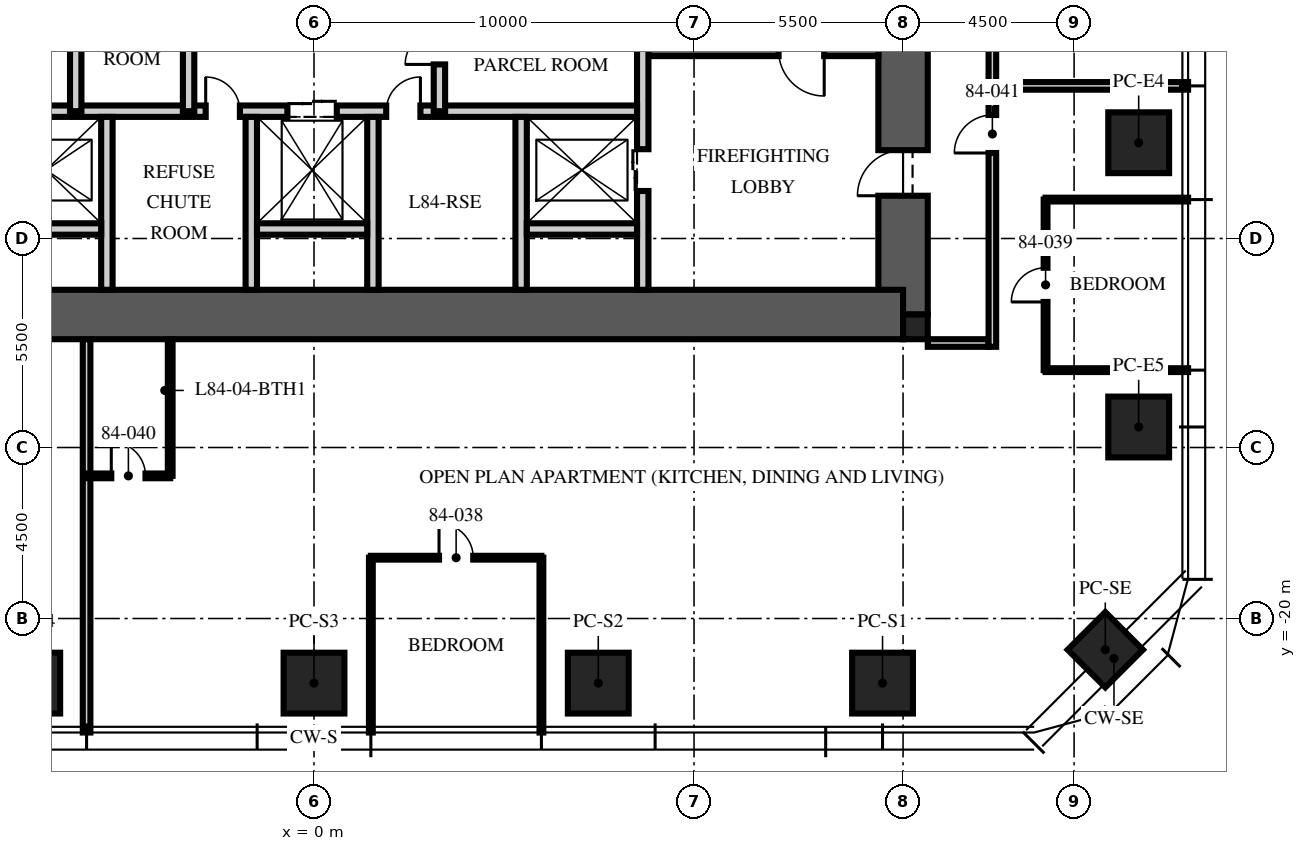
"""IFC4 building model, lengths in metres.
Left out: names, types, materials, properties, quantities, classifications, styles, units other than length and angle.
Written with IfcOpenShell. Run it as: python <this file> out.ifc"""

import sys

from ifc_helpers import new_model, si_unit, direction, frame, frame_2d, origin, origin_2d, place, context, subcontext, project, spatial, rectangle, extrude, element, fill, save


model = new_model("IFC4")
c1 = context("Model", 3, precision=1e-05, world=origin(), true_north=direction((0.0, 1.0)))
c2 = subcontext(c1, "Body", "Model", "MODEL_VIEW")
j1 = project(units=[si_unit("LENGTHUNIT", "METRE"), si_unit("PLANEANGLEUNIT", "RADIAN")], contexts=[c1])
p1 = place(None, origin())
s1 = spatial("IfcSite", under=j1, at=p1, CompositionType="ELEMENT")
p2 = place(p1, origin())
s2 = spatial("IfcBuilding", under=s1, at=p2, CompositionType="ELEMENT")
p3 = place(p2, frame((0.0, 0.0, 334.5)))
s3 = spatial("IfcBuildingStorey", under=s2, at=p3, CompositionType="ELEMENT", Elevation=334.5)
p4 = place(p3, frame((15.5, -12.0, -0.25), z_axis=(0.0, 0.0, 1.0), x_axis=(0.0, 1.0, 0.0)))
e1 = element("IfcWall", 1, at=p4, inside=s3, PredefinedType="SHEAR", context=c2, shape_type="SweptSolid", body=[
    extrude(rectangle(XDim=24.0, YDim=1.3, at=frame_2d((12.0, 0.0))), origin(), (0.0, 0.0, 1.0), 3.75),
])
p5 = place(p4, frame((3.125, 0.0, 0.25)))
e2 = element("IfcOpeningElement", 2, at=p5, cuts=e1, PredefinedType="OPENING", context=c2, shape_type="SweptSolid", body=[
    extrude(rectangle(XDim=1.2, YDim=2.1, at=frame_2d((0.6, 1.05))), frame((0.0, 0.66, 0.0), z_axis=(0.0, -1.0, 0.0), x_axis=(1.0, 0.0, 0.0)), (0.0, 0.0, 1.0), 1.32),
])
p6 = place(p4, frame((19.375, 0.0, 0.25)))
e3 = element("IfcOpeningElement", 3, at=p6, cuts=e1, PredefinedType="OPENING", context=c2, shape_type="SweptSolid", body=[
    extrude(rectangle(XDim=1.8, YDim=2.1, at=frame_2d((0.9, 1.05))), frame((0.0, 0.66, 0.0), z_axis=(0.0, -1.0, 0.0), x_axis=(1.0, 0.0, 0.0)), (0.0, 0.0, 1.0), 1.32),
])
p7 = place(p3, frame((-15.5, -12.0, -0.25), z_axis=(0.0, 0.0, 1.0), x_axis=(1.0, 0.0, 0.0)))
e4 = element("IfcWall", 4, at=p7, inside=s3, PredefinedType="SHEAR", context=c2, shape_type="SweptSolid", body=[
    extrude(rectangle(XDim=31.0, YDim=1.3, at=frame_2d((15.5, 0.0))), origin(), (0.0, 0.0, 1.0), 3.75),
])
p8 = place(p3, frame((15.825, -12.325, -0.25), z_axis=(0.0, 0.0, 1.0), x_axis=(1.0, 0.0, 0.0)))
e5 = element("IfcColumn", 5, at=p8, inside=s3, PredefinedType="COLUMN", context=c2, shape_type="SweptSolid", body=[
    extrude(rectangle(XDim=0.65, YDim=0.65, at=origin_2d()), origin(), (0.0, 0.0, 1.0), 3.75),
])
for number, where, z_axis, x_axis in (
    (6, (21.7, -7.48, 0.0), (0.0, 0.0, 1.0), (0.0, 1.0, 0.0)),
    (7, (21.7, -14.96, 0.0), (0.0, 0.0, 1.0), (0.0, 1.0, 0.0)),
    (8, (14.96, -21.7, 0.0), (0.0, 0.0, 1.0), (1.0, 0.0, 0.0)),
    (9, (7.48, -21.7, 0.0), (0.0, 0.0, 1.0), (1.0, 0.0, 0.0)),
    (10, (0.0, -21.7, 0.0), (0.0, 0.0, 1.0), (1.0, 0.0, 0.0)),
    (11, (-7.48, -21.7, 0.0), (0.0, 0.0, 1.0), (1.0, 0.0, 0.0)),
):
    element("IfcColumn", number, at=place(p3, frame(where, z_axis=z_axis, x_axis=x_axis)), inside=s3, PredefinedType="COLUMN", context=c2, shape_type="SweptSolid", body=[
        extrude(rectangle(XDim=1.6, YDim=1.6, at=origin_2d()), origin(), (0.0, 0.0, 1.0), 3.75),
    ])
p9 = place(p3, frame((20.821, -20.821, 0.0), z_axis=(0.0, 0.0, 1.0), x_axis=(0.707106781187, 0.707106781187, 0.0)))
e12 = element("IfcColumn", 12, at=p9, inside=s3, PredefinedType="COLUMN", context=c2, shape_type="SweptSolid", body=[
    extrude(rectangle(XDim=1.4, YDim=1.4, at=origin_2d()), origin(), (0.0, 0.0, 1.0), 3.75),
])
p10 = place(p3, frame((14.85, -5.05, 0.0), z_axis=(0.0, 0.0, 1.0), x_axis=(-1.0, 0.0, 0.0)))
e13 = element("IfcWall", 13, at=p10, inside=s3, PredefinedType="SOLIDWALL", context=c2, shape_type="SweptSolid", body=[
    extrude(rectangle(XDim=6.05, YDim=0.3, at=frame_2d((3.025, 0.0))), origin(), (0.0, 0.0, 1.0), 3.5),
])
p11 = place(p10, frame((1.425, 0.0, 0.0)))
e14 = element("IfcOpeningElement", 14, at=p11, cuts=e13, PredefinedType="OPENING", context=c2, shape_type="SweptSolid", body=[
    extrude(rectangle(XDim=1.2, YDim=2.1, at=frame_2d((0.6, 1.05))), frame((0.0, 0.16, 0.0), z_axis=(0.0, -1.0, 0.0), x_axis=(1.0, 0.0, 0.0)), (0.0, 0.0, 1.0), 0.32),
])
p12 = place(p3, frame((8.65, -11.35, 0.0), z_axis=(0.0, 0.0, 1.0), x_axis=(0.0, 1.0, 0.0)))
e15 = element("IfcWall", 15, at=p12, inside=s3, PredefinedType="PARTITIONING", context=c2, shape_type="SweptSolid", body=[
    extrude(rectangle(XDim=6.45, YDim=0.3, at=frame_2d((3.225, 0.0))), origin(), (0.0, 0.0, 1.0), 3.5),
])
p13 = place(p12, frame((2.6, 0.0, 0.0)))
e16 = element("IfcOpeningElement", 16, at=p13, cuts=e15, PredefinedType="OPENING", context=c2, shape_type="SweptSolid", body=[
    extrude(rectangle(XDim=1.1, YDim=2.1, at=frame_2d((0.55, 1.05))), frame((0.0, 0.16, 0.0), z_axis=(0.0, -1.0, 0.0), x_axis=(1.0, 0.0, 0.0)), (0.0, 0.0, 1.0), 0.32),
])
p14 = place(p3, frame((-8.5, -6.65, 0.0), z_axis=(0.0, 0.0, 1.0), x_axis=(1.0, 0.0, 0.0)))
e17 = element("IfcWall", 17, at=p14, inside=s3, PredefinedType="PARTITIONING", context=c2, shape_type="SweptSolid", body=[
    extrude(rectangle(XDim=17.0, YDim=0.3, at=frame_2d((8.5, 0.0))), origin(), (0.0, 0.0, 1.0), 3.5),
])
p15 = place(p14, frame((7.8, 0.0, 0.0)))
e18 = element("IfcOpeningElement", 18, at=p15, cuts=e17, PredefinedType="OPENING", context=c2, shape_type="SweptSolid", body=[
    extrude(rectangle(XDim=1.3, YDim=2.4, at=frame_2d((0.65, 1.2))), frame((0.0, 0.16, 0.0), z_axis=(0.0, -1.0, 0.0), x_axis=(1.0, 0.0, 0.0)), (0.0, 0.0, 1.0), 0.32),
])
p16 = place(p14, frame((5.65, 0.0, 0.0)))
e19 = element("IfcOpeningElement", 19, at=p16, cuts=e17, PredefinedType="OPENING", context=c2, shape_type="SweptSolid", body=[
    extrude(rectangle(XDim=0.9, YDim=2.1, at=frame_2d((0.45, 1.05))), frame((0.0, 0.16, 0.0), z_axis=(0.0, -1.0, 0.0), x_axis=(1.0, 0.0, 0.0)), (0.0, 0.0, 1.0), 0.32),
])
p17 = place(p14, frame((10.4, 0.0, 0.0)))
e20 = element("IfcOpeningElement", 20, at=p17, cuts=e17, PredefinedType="OPENING", context=c2, shape_type="SweptSolid", body=[
    extrude(rectangle(XDim=0.9, YDim=2.1, at=frame_2d((0.45, 1.05))), frame((0.0, 0.16, 0.0), z_axis=(0.0, -1.0, 0.0), x_axis=(1.0, 0.0, 0.0)), (0.0, 0.0, 1.0), 0.32),
])
for number, where, z_axis, x_axis in (
    (21, (-5.45, -11.35, 0.0), (0.0, 0.0, 1.0), (0.0, 1.0, 0.0)),
    (22, (-1.65, -11.35, 0.0), (0.0, 0.0, 1.0), (0.0, 1.0, 0.0)),
    (23, (1.55, -11.35, 0.0), (0.0, 0.0, 1.0), (0.0, 1.0, 0.0)),
    (24, (5.45, -11.35, 0.0), (0.0, 0.0, 1.0), (0.0, 1.0, 0.0)),
):
    element("IfcWall", number, at=place(p3, frame(where, z_axis=z_axis, x_axis=x_axis)), inside=s3, PredefinedType="PARTITIONING", context=c2, shape_type="SweptSolid", body=[
        extrude(rectangle(XDim=4.55, YDim=0.3, at=frame_2d((2.275, 0.0))), origin(), (0.0, 0.0, 1.0), 3.5),
    ])
for number, where, z_axis, x_axis in (
    (25, (-8.5, -9.75, 0.0), (0.0, 0.0, 1.0), (1.0, 0.0, 0.0)),
    (26, (-1.5, -9.75, 0.0), (0.0, 0.0, 1.0), (1.0, 0.0, 0.0)),
    (27, (5.6, -9.75, 0.0), (0.0, 0.0, 1.0), (1.0, 0.0, 0.0)),
):
    element("IfcWall", number, at=place(p3, frame(where, z_axis=z_axis, x_axis=x_axis)), inside=s3, PredefinedType="PARTITIONING", context=c2, shape_type="SweptSolid", body=[
        extrude(rectangle(XDim=2.9, YDim=0.3, at=frame_2d((1.45, 0.0))), origin(), (0.0, 0.0, 1.0), 3.5),
    ])
p18 = place(p3, frame((-3.3, -6.65, 0.0), z_axis=(0.0, 0.0, 1.0), x_axis=(0.0, 1.0, 0.0)))
e28 = element("IfcWall", 28, at=p18, inside=s3, PredefinedType="PARTITIONING", context=c2, shape_type="SweptSolid", body=[
    extrude(rectangle(XDim=7.45, YDim=0.3, at=frame_2d((3.725, 0.0))), origin(), (0.0, 0.0, 1.0), 3.5),
])
p19 = place(p18, frame((3.275, 0.0, 0.0)))
e29 = element("IfcOpeningElement", 29, at=p19, cuts=e28, PredefinedType="OPENING", context=c2, shape_type="SweptSolid", body=[
    extrude(rectangle(XDim=0.9, YDim=2.1, at=frame_2d((0.45, 1.05))), frame((0.0, 0.16, 0.0), z_axis=(0.0, -1.0, 0.0), x_axis=(1.0, 0.0, 0.0)), (0.0, 0.0, 1.0), 0.32),
])
p20 = place(p3, frame((3.3, -6.65, 0.0), z_axis=(0.0, 0.0, 1.0), x_axis=(0.0, 1.0, 0.0)))
e30 = element("IfcWall", 30, at=p20, inside=s3, PredefinedType="PARTITIONING", context=c2, shape_type="SweptSolid", body=[
    extrude(rectangle(XDim=7.45, YDim=0.3, at=frame_2d((3.725, 0.0))), origin(), (0.0, 0.0, 1.0), 3.5),
])
p21 = place(p20, frame((1.231, 0.0, 0.0)))
e31 = element("IfcOpeningElement", 31, at=p21, cuts=e30, PredefinedType="OPENING", context=c2, shape_type="SweptSolid", body=[
    extrude(rectangle(XDim=0.9, YDim=2.1, at=frame_2d((0.45, 1.05))), frame((0.0, 0.16, 0.0), z_axis=(0.0, -1.0, 0.0), x_axis=(1.0, 0.0, 0.0)), (0.0, 0.0, 1.0), 0.32),
])
p22 = place(p20, frame((4.956, 0.0, 0.0)))
e32 = element("IfcOpeningElement", 32, at=p22, cuts=e30, PredefinedType="OPENING", context=c2, shape_type="SweptSolid", body=[
    extrude(rectangle(XDim=0.9, YDim=2.1, at=frame_2d((0.45, 1.05))), frame((0.0, 0.16, 0.0), z_axis=(0.0, -1.0, 0.0), x_axis=(1.0, 0.0, 0.0)), (0.0, 0.0, 1.0), 0.32),
])
p23 = place(p3, frame((-6.27, -6.65, 0.0), z_axis=(0.0, 0.0, 1.0), x_axis=(0.0, 1.0, 0.0)))
e33 = element("IfcWall", 33, at=p23, inside=s3, PredefinedType="PARTITIONING", context=c2, shape_type="SweptSolid", body=[
    extrude(rectangle(XDim=7.45, YDim=0.3, at=frame_2d((3.725, 0.0))), origin(), (0.0, 0.0, 1.0), 3.5),
])
p24 = place(p3, frame((16.15, -12.75, 0.0), z_axis=(0.0, 0.0, 1.0), x_axis=(1.0, 0.0, 0.0)))
e34 = element("IfcWall", 34, at=p24, inside=s3, PredefinedType="PARTITIONING", context=c2, shape_type="SweptSolid", body=[
    extrude(rectangle(XDim=1.6, YDim=0.2, at=frame_2d((0.8, 0.0))), origin(), (0.0, 0.0, 1.0), 2.6),
])
p25 = place(p3, frame((17.95, -5.984, 0.0), z_axis=(0.0, 0.0, 1.0), x_axis=(1.0, 0.0, 0.0)))
e35 = element("IfcWall", 35, at=p25, inside=s3, PredefinedType="PARTITIONING", context=c2, shape_type="SweptSolid", body=[
    extrude(rectangle(XDim=5.05, YDim=0.2, at=frame_2d((2.525, 0.0))), origin(), (0.0, 0.0, 1.0), 3.01),
])
p26 = place(p3, frame((-5.984, -12.65, 0.0), z_axis=(0.0, 0.0, 1.0), x_axis=(0.0, -1.0, 0.0)))
e36 = element("IfcWall", 36, at=p26, inside=s3, PredefinedType="PARTITIONING", context=c2, shape_type="SweptSolid", body=[
    extrude(rectangle(XDim=10.35, YDim=0.2, at=frame_2d((5.175, 0.0))), origin(), (0.0, 0.0, 1.0), 3.01),
])
for number, where, z_axis, x_axis in (
    (37, (1.496, -18.4, 0.0), (0.0, 0.0, 1.0), (0.0, -1.0, 0.0)),
    (38, (5.984, -18.4, 0.0), (0.0, 0.0, 1.0), (0.0, -1.0, 0.0)),
):
    element("IfcWall", number, at=place(p3, frame(where, z_axis=z_axis, x_axis=x_axis)), inside=s3, PredefinedType="PARTITIONING", context=c2, shape_type="SweptSolid", body=[
        extrude(rectangle(XDim=4.6, YDim=0.1, at=frame_2d((2.3, 0.0))), origin(), (0.0, 0.0, 1.0), 3.01),
    ])
for number, where, z_axis, x_axis in (
    (39, (19.25, -13.464, 0.0), (0.0, 0.0, 1.0), (1.0, 0.0, 0.0)),
    (40, (19.25, -8.976, 0.0), (0.0, 0.0, 1.0), (1.0, 0.0, 0.0)),
):
    element("IfcWall", number, at=place(p3, frame(where, z_axis=z_axis, x_axis=x_axis)), inside=s3, PredefinedType="PARTITIONING", context=c2, shape_type="SweptSolid", body=[
        extrude(rectangle(XDim=3.75, YDim=0.1, at=frame_2d((1.875, 0.0))), origin(), (0.0, 0.0, 1.0), 3.01),
    ])
p27 = place(p3, frame((1.496, -18.4, 0.0), z_axis=(0.0, 0.0, 1.0), x_axis=(1.0, 0.0, 0.0)))
e41 = element("IfcWall", 41, at=p27, inside=s3, PredefinedType="PARTITIONING", context=c2, shape_type="SweptSolid", body=[
    extrude(rectangle(XDim=4.488, YDim=0.1, at=frame_2d((2.244, 0.0))), origin(), (0.0, 0.0, 1.0), 2.91),
])
p28 = place(p27, frame((1.794, 0.0, 0.0)))
e42 = element("IfcOpeningElement", 42, at=p28, cuts=e41, PredefinedType="OPENING", context=c2, shape_type="SweptSolid", body=[
    extrude(rectangle(XDim=0.9, YDim=2.1, at=frame_2d((0.45, 1.05))), frame((0.0, 0.06, 0.0), z_axis=(0.0, -1.0, 0.0), x_axis=(1.0, 0.0, 0.0)), (0.0, 0.0, 1.0), 0.12),
])
p29 = place(p3, frame((19.25, -13.464, 0.0), z_axis=(0.0, 0.0, 1.0), x_axis=(0.0, 1.0, 0.0)))
e43 = element("IfcWall", 43, at=p29, inside=s3, PredefinedType="PARTITIONING", context=c2, shape_type="SweptSolid", body=[
    extrude(rectangle(XDim=4.488, YDim=0.1, at=frame_2d((2.244, 0.0))), origin(), (0.0, 0.0, 1.0), 2.91),
])
p30 = place(p29, frame((1.794, 0.0, 0.0)))
e44 = element("IfcOpeningElement", 44, at=p30, cuts=e43, PredefinedType="OPENING", context=c2, shape_type="SweptSolid", body=[
    extrude(rectangle(XDim=0.9, YDim=2.1, at=frame_2d((0.45, 1.05))), frame((0.0, 0.06, 0.0), z_axis=(0.0, -1.0, 0.0), x_axis=(1.0, 0.0, 0.0)), (0.0, 0.0, 1.0), 0.12),
])
p31 = place(p3, frame((-5.984, -16.246, 0.0), z_axis=(0.0, 0.0, 1.0), x_axis=(1.0, 0.0, 0.0)))
e45 = element("IfcWall", 45, at=p31, inside=s3, PredefinedType="PARTITIONING", context=c2, shape_type="SweptSolid", body=[
    extrude(rectangle(XDim=2.2, YDim=0.125, at=frame_2d((1.1, 0.0))), origin(), (0.0, 0.0, 1.0), 2.91),
])
p32 = place(p31, frame((0.65, 0.0, 0.0)))
e46 = element("IfcOpeningElement", 46, at=p32, cuts=e45, PredefinedType="OPENING", context=c2, shape_type="SweptSolid", body=[
    extrude(rectangle(XDim=0.9, YDim=2.1, at=frame_2d((0.45, 1.05))), frame((0.0, 0.073, 0.0), z_axis=(0.0, -1.0, 0.0), x_axis=(1.0, 0.0, 0.0)), (0.0, 0.0, 1.0), 0.145),
])
p33 = place(p3, frame((-3.784, -12.65, 0.0), z_axis=(0.0, 0.0, 1.0), x_axis=(0.0, -1.0, 0.0)))
e47 = element("IfcWall", 47, at=p33, inside=s3, PredefinedType="PARTITIONING", context=c2, shape_type="SweptSolid", body=[
    extrude(rectangle(XDim=3.596, YDim=0.125, at=frame_2d((1.798, 0.0))), origin(), (0.0, 0.0, 1.0), 2.91),
])
p34 = place(p3, frame((17.85, -12.85, 0.0), z_axis=(0.0, 0.0, 1.0), x_axis=(0.0, 1.0, 0.0)))
e48 = element("IfcWall", 48, at=p34, inside=s3, PredefinedType="PARTITIONING", context=c2, shape_type="SweptSolid", body=[
    extrude(rectangle(XDim=25.5, YDim=0.2, at=frame_2d((12.75, 0.0))), origin(), (0.0, 0.0, 1.0), 2.9),
])
p35 = place(p34, frame((23.386, 0.0, 0.0)))
e49 = element("IfcOpeningElement", 49, at=p35, cuts=e48, PredefinedType="OPENING", context=c2, shape_type="SweptSolid", body=[
    extrude(rectangle(XDim=1.0, YDim=2.2, at=frame_2d((0.5, 1.1))), frame((0.0, 0.11, 0.0), z_axis=(0.0, -1.0, 0.0), x_axis=(1.0, 0.0, 0.0)), (0.0, 0.0, 1.0), 0.22),
])
p36 = place(p34, frame((5.1, 0.0, 0.0)))
e50 = element("IfcOpeningElement", 50, at=p36, cuts=e48, PredefinedType="OPENING", context=c2, shape_type="SweptSolid", body=[
    extrude(rectangle(XDim=1.0, YDim=2.2, at=frame_2d((0.5, 1.1))), frame((0.0, 0.11, 0.0), z_axis=(0.0, -1.0, 0.0), x_axis=(1.0, 0.0, 0.0)), (0.0, 0.0, 1.0), 0.22),
])
p37 = place(p5, origin())
e51 = element("IfcDoor", 51, at=p37, inside=s3, OperationType="SINGLE_SWING_LEFT", PredefinedType="DOOR", context=c2, shape_type="SweptSolid", body=[
    extrude(rectangle(XDim=1.2, YDim=2.1, at=frame_2d((0.6, 1.05))), frame((0.0, 0.025, 0.0), z_axis=(0.0, -1.0, 0.0), x_axis=(1.0, 0.0, 0.0)), (0.0, 0.0, 1.0), 0.05),
])
fill(e2, e51)
p38 = place(p13, origin())
e52 = element("IfcDoor", 52, at=p38, inside=s3, OperationType="DOUBLE_DOOR_SLIDING", PredefinedType="DOOR", context=c2, shape_type="SweptSolid", body=[
    extrude(rectangle(XDim=1.1, YDim=2.1, at=frame_2d((0.55, 1.05))), frame((0.0, 0.025, 0.0), z_axis=(0.0, -1.0, 0.0), x_axis=(1.0, 0.0, 0.0)), (0.0, 0.0, 1.0), 0.05),
])
fill(e16, e52)
p39 = place(p15, origin())
e53 = element("IfcDoor", 53, at=p39, inside=s3, OperationType="DOUBLE_DOOR_SLIDING", PredefinedType="DOOR", context=c2, shape_type="SweptSolid", body=[
    extrude(rectangle(XDim=1.3, YDim=2.4, at=frame_2d((0.65, 1.2))), frame((0.0, 0.025, 0.0), z_axis=(0.0, -1.0, 0.0), x_axis=(1.0, 0.0, 0.0)), (0.0, 0.0, 1.0), 0.05),
])
fill(e18, e53)
p40 = place(p16, origin())
e54 = element("IfcDoor", 54, at=p40, inside=s3, OperationType="SINGLE_SWING_LEFT", PredefinedType="DOOR", context=c2, shape_type="SweptSolid", body=[
    extrude(rectangle(XDim=0.9, YDim=2.1, at=frame_2d((0.45, 1.05))), frame((0.0, 0.025, 0.0), z_axis=(0.0, -1.0, 0.0), x_axis=(1.0, 0.0, 0.0)), (0.0, 0.0, 1.0), 0.05),
])
fill(e19, e54)
p41 = place(p17, origin())
e55 = element("IfcDoor", 55, at=p41, inside=s3, OperationType="SINGLE_SWING_RIGHT", PredefinedType="DOOR", context=c2, shape_type="SweptSolid", body=[
    extrude(rectangle(XDim=0.9, YDim=2.1, at=frame_2d((0.45, 1.05))), frame((0.0, 0.025, 0.0), z_axis=(0.0, -1.0, 0.0), x_axis=(1.0, 0.0, 0.0)), (0.0, 0.0, 1.0), 0.05),
])
fill(e20, e55)
p42 = place(p21, origin())
e56 = element("IfcDoor", 56, at=p42, inside=s3, OperationType="SINGLE_SWING_LEFT", PredefinedType="DOOR", context=c2, shape_type="SweptSolid", body=[
    extrude(rectangle(XDim=0.9, YDim=2.1, at=frame_2d((0.45, 1.05))), frame((0.0, 0.025, 0.0), z_axis=(0.0, -1.0, 0.0), x_axis=(1.0, 0.0, 0.0)), (0.0, 0.0, 1.0), 0.05),
])
fill(e31, e56)
p43 = place(p28, origin())
e57 = element("IfcDoor", 57, at=p43, inside=s3, OperationType="SINGLE_SWING_LEFT", PredefinedType="DOOR", context=c2, shape_type="SweptSolid", body=[
    extrude(rectangle(XDim=0.9, YDim=2.1, at=frame_2d((0.45, 1.05))), frame((0.0, 0.025, 0.0), z_axis=(0.0, -1.0, 0.0), x_axis=(1.0, 0.0, 0.0)), (0.0, 0.0, 1.0), 0.05),
])
fill(e42, e57)
p44 = place(p30, origin())
e58 = element("IfcDoor", 58, at=p44, inside=s3, OperationType="SINGLE_SWING_LEFT", PredefinedType="DOOR", context=c2, shape_type="SweptSolid", body=[
    extrude(rectangle(XDim=0.9, YDim=2.1, at=frame_2d((0.45, 1.05))), frame((0.0, 0.025, 0.0), z_axis=(0.0, -1.0, 0.0), x_axis=(1.0, 0.0, 0.0)), (0.0, 0.0, 1.0), 0.05),
])
fill(e44, e58)
p45 = place(p32, origin())
e59 = element("IfcDoor", 59, at=p45, inside=s3, OperationType="SINGLE_SWING_LEFT", PredefinedType="DOOR", context=c2, shape_type="SweptSolid", body=[
    extrude(rectangle(XDim=0.9, YDim=2.1, at=frame_2d((0.45, 1.05))), frame((0.0, 0.025, 0.0), z_axis=(0.0, -1.0, 0.0), x_axis=(1.0, 0.0, 0.0)), (0.0, 0.0, 1.0), 0.05),
])
fill(e46, e59)
p46 = place(p36, origin())
e60 = element("IfcDoor", 60, at=p46, inside=s3, OperationType="SINGLE_SWING_LEFT", PredefinedType="DOOR", context=c2, shape_type="SweptSolid", body=[
    extrude(rectangle(XDim=1.0, YDim=2.2, at=frame_2d((0.5, 1.1))), frame((0.0, 0.025, 0.0), z_axis=(0.0, -1.0, 0.0), x_axis=(1.0, 0.0, 0.0)), (0.0, 0.0, 1.0), 0.05),
])
fill(e50, e60)
save(model, sys.argv[1])
